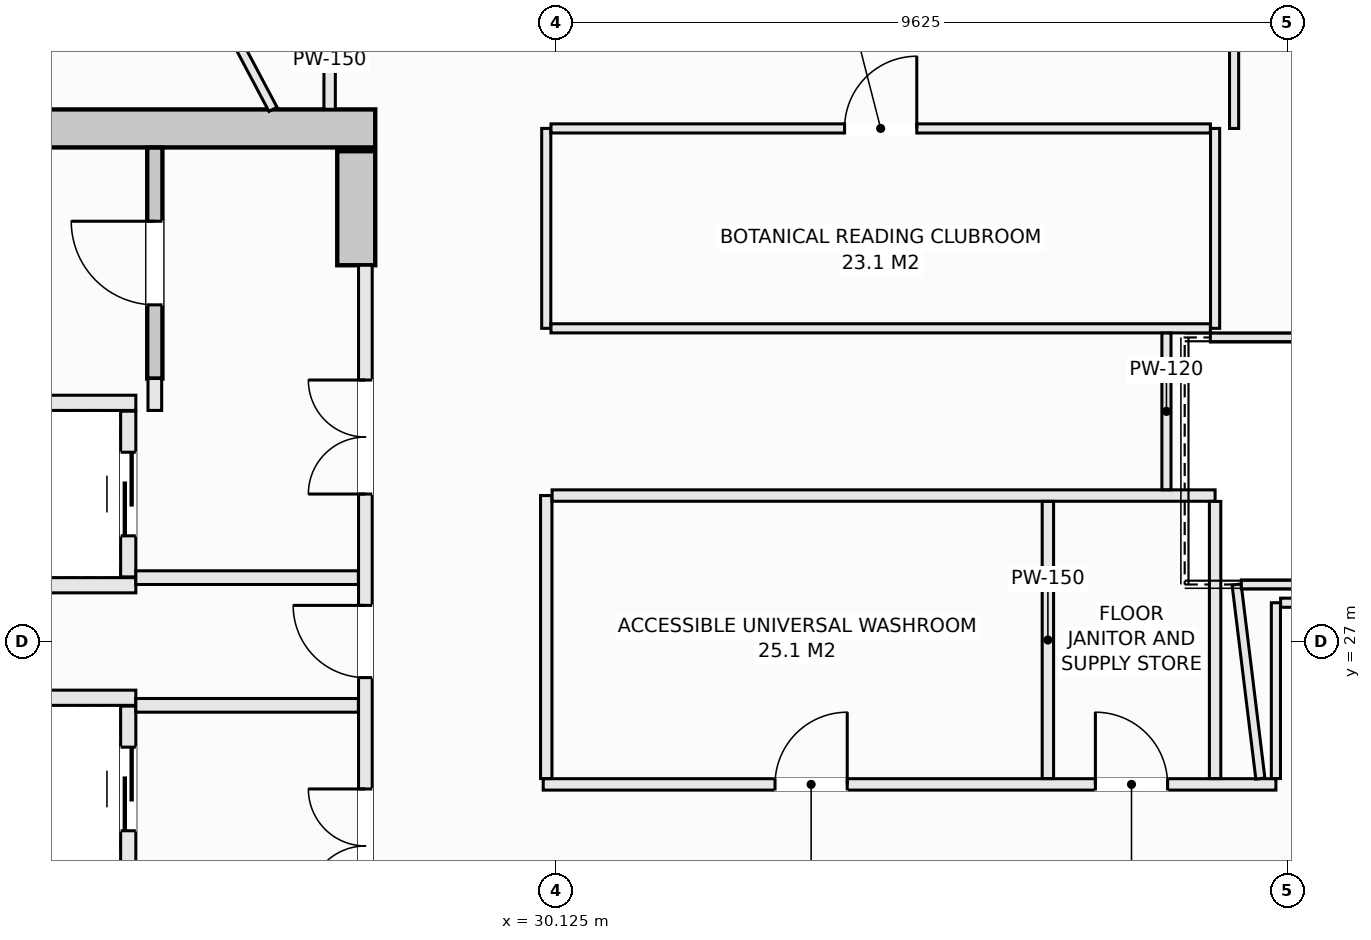
"""IFC4 building model, lengths in metres.
Left out: names, types, materials, properties, quantities, classifications, styles, units other than length and angle.
Written with IfcOpenShell. Run it as: python <this file> out.ifc"""

import sys

from ifc_helpers import new_model, si_unit, direction, frame, frame_2d, origin, place, context, subcontext, project, spatial, rectangle, extrude, element, fill, save


model = new_model("IFC4")
c1 = context("Model", 3, precision=1e-05, world=origin(), true_north=direction((0.0, 1.0)))
c2 = subcontext(c1, "Body", "Model", "MODEL_VIEW")
j1 = project(units=[si_unit("LENGTHUNIT", "METRE"), si_unit("PLANEANGLEUNIT", "RADIAN")], contexts=[c1])
p1 = place(None, origin())
s1 = spatial("IfcSite", under=j1, at=p1, CompositionType="ELEMENT")
p2 = place(p1, origin())
s2 = spatial("IfcBuilding", under=s1, at=p2, CompositionType="ELEMENT")
p3 = place(p2, frame((0.0, 0.0, 212.9)))
s3 = spatial("IfcBuildingStorey", under=s2, at=p3, CompositionType="ELEMENT", Elevation=212.9)
p4 = place(p3, frame((14.25, 33.75, -0.27), z_axis=(0.0, 0.0, 1.0), x_axis=(1.0, 0.0, 0.0)))
e1 = element("IfcWall", 1, at=p4, inside=s3, PredefinedType="SHEAR", context=c2, shape_type="SweptSolid", body=[
    extrude(rectangle(XDim=13.5, YDim=0.5, at=frame_2d((6.75, 0.0))), origin(), (0.0, 0.0, 1.0), 3.3),
])
p5 = place(p3, frame((27.5, 31.95, -0.27), z_axis=(0.0, 0.0, 1.0), x_axis=(0.0, 1.0, 0.0)))
e2 = element("IfcWall", 2, at=p5, inside=s3, PredefinedType="SHEAR", context=c2, shape_type="SweptSolid", body=[
    extrude(rectangle(XDim=1.5, YDim=0.5, at=frame_2d((0.75, 0.0))), origin(), (0.0, 0.0, 1.0), 3.3),
])
p6 = place(p3, frame((24.85, 30.46, -0.27), z_axis=(0.0, 0.0, 1.0), x_axis=(0.0, 1.0, 0.0)))
e3 = element("IfcWall", 3, at=p6, inside=s3, PredefinedType="SHEAR", context=c2, shape_type="SweptSolid", body=[
    extrude(rectangle(XDim=3.038, YDim=0.2, at=frame_2d((1.519, 0.0))), origin(), (0.0, 0.0, 1.0), 3.3),
])
p7 = place(p6, frame((0.969, 0.0, 0.27)))
e4 = element("IfcOpeningElement", 4, at=p7, cuts=e3, PredefinedType="OPENING", context=c2, shape_type="SweptSolid", body=[
    extrude(rectangle(XDim=1.1, YDim=2.15, at=frame_2d((0.55, 1.075))), frame((0.0, 0.11, 0.0), z_axis=(0.0, -1.0, 0.0), x_axis=(1.0, 0.0, 0.0)), (0.0, 0.0, 1.0), 0.22),
])
for number, where, z_axis, x_axis in (
    (5, (22.15, 30.14, 0.0), (0.0, 0.0, 1.0), (1.0, 0.0, 0.0)),
    (6, (22.15, 27.74, 0.0), (0.0, 0.0, 1.0), (1.0, 0.0, 0.0)),
):
    element("IfcWall", number, at=place(p3, frame(where, z_axis=z_axis, x_axis=x_axis)), inside=s3, PredefinedType="SOLIDWALL", context=c2, shape_type="SweptSolid", body=[
        extrude(rectangle(XDim=2.45, YDim=0.2, at=frame_2d((1.225, 0.0))), origin(), (0.0, 0.0, 1.0), 3.03),
    ])
p8 = place(p3, frame((24.5, 27.85, 0.0), z_axis=(0.0, 0.0, 1.0), x_axis=(0.0, 1.0, 0.0)))
e7 = element("IfcWall", 7, at=p8, inside=s3, PredefinedType="SOLIDWALL", context=c2, shape_type="SweptSolid", body=[
    extrude(rectangle(XDim=2.18, YDim=0.2, at=frame_2d((1.09, 0.0))), origin(), (0.0, 0.0, 1.0), 3.03),
])
p9 = place(p8, frame((0.54, 0.0, 0.0)))
e8 = element("IfcOpeningElement", 8, at=p9, cuts=e7, PredefinedType="OPENING", context=c2, shape_type="SweptSolid", body=[
    extrude(rectangle(XDim=1.1, YDim=2.2, at=frame_2d((0.55, 1.1))), frame((0.0, 0.11, 0.0), z_axis=(0.0, -1.0, 0.0), x_axis=(1.0, 0.0, 0.0)), (0.0, 0.0, 1.0), 0.22),
])
p10 = place(p3, frame((22.15, 26.26, 0.0), z_axis=(0.0, 0.0, 1.0), x_axis=(1.0, 0.0, 0.0)))
e9 = element("IfcWall", 9, at=p10, inside=s3, PredefinedType="SOLIDWALL", context=c2, shape_type="SweptSolid", body=[
    extrude(rectangle(XDim=2.45, YDim=0.2, at=frame_2d((1.225, 0.0))), origin(), (0.0, 0.0, 1.0), 3.03),
])
p11 = place(p3, frame((24.5, 23.97, 0.0), z_axis=(0.0, 0.0, 1.0), x_axis=(0.0, 1.0, 0.0)))
e10 = element("IfcWall", 10, at=p11, inside=s3, PredefinedType="SOLIDWALL", context=c2, shape_type="SweptSolid", body=[
    extrude(rectangle(XDim=2.18, YDim=0.2, at=frame_2d((1.09, 0.0))), origin(), (0.0, 0.0, 1.0), 3.03),
])
p12 = place(p11, frame((0.54, 0.0, 0.0)))
e11 = element("IfcOpeningElement", 11, at=p12, cuts=e10, PredefinedType="OPENING", context=c2, shape_type="SweptSolid", body=[
    extrude(rectangle(XDim=1.1, YDim=2.2, at=frame_2d((0.55, 1.1))), frame((0.0, 0.11, 0.0), z_axis=(0.0, -1.0, 0.0), x_axis=(1.0, 0.0, 0.0)), (0.0, 0.0, 1.0), 0.22),
])
p13 = place(p3, frame((24.85, 30.04, 0.0), z_axis=(0.0, 0.0, 1.0), x_axis=(0.0, 1.0, 0.0)))
e12 = element("IfcWall", 12, at=p13, inside=s3, PredefinedType="SOLIDWALL", context=c2, shape_type="SweptSolid", body=[
    extrude(rectangle(XDim=0.42, YDim=0.18, at=frame_2d((0.21, 0.0))), origin(), (0.0, 0.0, 1.0), 3.03),
])
p14 = place(p3, frame((27.62, 22.05, 0.0), z_axis=(0.0, 0.0, 1.0), x_axis=(0.0, 1.0, 0.0)))
e13 = element("IfcWall", 13, at=p14, inside=s3, PredefinedType="SOLIDWALL", context=c2, shape_type="SweptSolid", body=[
    extrude(rectangle(XDim=9.9, YDim=0.18, at=frame_2d((4.95, 0.0))), origin(), (0.0, 0.0, 1.0), 3.03),
])
p15 = place(p14, frame((4.475, 0.0, 0.0)))
e14 = element("IfcOpeningElement", 14, at=p15, cuts=e13, PredefinedType="OPENING", context=c2, shape_type="SweptSolid", body=[
    extrude(rectangle(XDim=0.95, YDim=2.1, at=frame_2d((0.475, 1.05))), frame((0.0, 0.1, 0.0), z_axis=(0.0, -1.0, 0.0), x_axis=(1.0, 0.0, 0.0)), (0.0, 0.0, 1.0), 0.2),
])
p16 = place(p14, frame((6.89, 0.0, 0.0)))
e15 = element("IfcOpeningElement", 15, at=p16, cuts=e13, PredefinedType="OPENING", context=c2, shape_type="SweptSolid", body=[
    extrude(rectangle(XDim=1.5, YDim=2.2, at=frame_2d((0.75, 1.1))), frame((0.0, 0.1, 0.0), z_axis=(0.0, -1.0, 0.0), x_axis=(1.0, 0.0, 0.0)), (0.0, 0.0, 1.0), 0.2),
])
p17 = place(p14, frame((1.51, 0.0, 0.0)))
e16 = element("IfcOpeningElement", 16, at=p17, cuts=e13, PredefinedType="OPENING", context=c2, shape_type="SweptSolid", body=[
    extrude(rectangle(XDim=1.5, YDim=2.2, at=frame_2d((0.75, 1.1))), frame((0.0, 0.1, 0.0), z_axis=(0.0, -1.0, 0.0), x_axis=(1.0, 0.0, 0.0)), (0.0, 0.0, 1.0), 0.2),
])
for number, where, z_axis, x_axis in (
    (17, (24.6, 27.84, 0.0), (0.0, 0.0, 1.0), (1.0, 0.0, 0.0)),
    (18, (24.6, 26.16, 0.0), (0.0, 0.0, 1.0), (1.0, 0.0, 0.0)),
):
    element("IfcWall", number, at=place(p3, frame(where, z_axis=z_axis, x_axis=x_axis)), inside=s3, PredefinedType="SOLIDWALL", context=c2, shape_type="SweptSolid", body=[
        extrude(rectangle(XDim=2.928, YDim=0.18, at=frame_2d((1.464, 0.0))), origin(), (0.0, 0.0, 1.0), 3.03),
    ])
p18 = place(p3, frame((27.15, 34.002, 0.0), z_axis=(0.0, 0.0, 1.0), x_axis=(0.0, 1.0, 0.0)))
e19 = element("IfcWall", 19, at=p18, inside=s3, PredefinedType="PARTITIONING", context=c2, shape_type="SweptSolid", body=[
    extrude(rectangle(XDim=4.198, YDim=0.15, at=frame_2d((2.099, 0.0))), origin(), (0.0, 0.0, 1.0), 3.03),
])
p19 = place(p18, frame((1.998, 0.0, 0.0)))
e20 = element("IfcOpeningElement", 20, at=p19, cuts=e19, PredefinedType="OPENING", context=c2, shape_type="SweptSolid", body=[
    extrude(rectangle(XDim=0.95, YDim=2.1, at=frame_2d((0.475, 1.05))), frame((0.0, 0.085, 0.0), z_axis=(0.0, -1.0, 0.0), x_axis=(1.0, 0.0, 0.0)), (0.0, 0.0, 1.0), 0.17),
])
p20 = place(p3, frame((29.96, 25.12, 0.0), z_axis=(0.0, 0.0, 1.0), x_axis=(1.0, 0.0, 0.0)))
e21 = element("IfcWall", 21, at=p20, inside=s3, PredefinedType="PARTITIONING", context=c2, shape_type="SweptSolid", body=[
    extrude(rectangle(XDim=9.64, YDim=0.15, at=frame_2d((4.82, 0.0))), origin(), (0.0, 0.0, 1.0), 3.03),
])
p21 = place(p20, frame((3.05, 0.0, 0.0)))
e22 = element("IfcOpeningElement", 22, at=p21, cuts=e21, PredefinedType="OPENING", context=c2, shape_type="SweptSolid", body=[
    extrude(rectangle(XDim=0.95, YDim=2.1, at=frame_2d((0.475, 1.05))), frame((0.0, 0.085, 0.0), z_axis=(0.0, -1.0, 0.0), x_axis=(1.0, 0.0, 0.0)), (0.0, 0.0, 1.0), 0.17),
])
p22 = place(p20, frame((7.265, 0.0, 0.0)))
e23 = element("IfcOpeningElement", 23, at=p22, cuts=e21, PredefinedType="OPENING", context=c2, shape_type="SweptSolid", body=[
    extrude(rectangle(XDim=0.95, YDim=2.1, at=frame_2d((0.475, 1.05))), frame((0.0, 0.085, 0.0), z_axis=(0.0, -1.0, 0.0), x_axis=(1.0, 0.0, 0.0)), (0.0, 0.0, 1.0), 0.17),
])
p23 = place(p3, frame((30.0, 25.197, 0.0), z_axis=(0.0, 0.0, 1.0), x_axis=(0.0, 1.0, 0.0)))
e24 = element("IfcWall", 24, at=p23, inside=s3, PredefinedType="PARTITIONING", context=c2, shape_type="SweptSolid", body=[
    extrude(rectangle(XDim=3.723, YDim=0.15, at=frame_2d((1.861, 0.0))), origin(), (0.0, 0.0, 1.0), 3.03),
])
p24 = place(p3, frame((30.0, 31.12, 0.0), z_axis=(0.0, 0.0, 1.0), x_axis=(0.0, 1.0, 0.0)))
e25 = element("IfcWall", 25, at=p24, inside=s3, PredefinedType="PARTITIONING", context=c2, shape_type="SweptSolid", body=[
    extrude(rectangle(XDim=2.63, YDim=0.12, at=frame_2d((1.315, 0.0))), origin(), (0.0, 0.0, 1.0), 3.03),
])
p25 = place(p3, frame((30.077, 28.92, 0.0), z_axis=(0.0, 0.0, 1.0), x_axis=(1.0, 0.0, 0.0)))
e26 = element("IfcWall", 26, at=p25, inside=s3, PredefinedType="PARTITIONING", context=c2, shape_type="SweptSolid", body=[
    extrude(rectangle(XDim=8.723, YDim=0.15, at=frame_2d((4.362, 0.0))), origin(), (0.0, 0.0, 1.0), 3.03),
])
for number, where, z_axis, x_axis in (
    (27, (36.6, 25.197, 0.0), (0.0, 0.0, 1.0), (0.0, 1.0, 0.0)),
    (28, (38.8, 25.197, 0.0), (0.0, 0.0, 1.0), (0.0, 1.0, 0.0)),
):
    element("IfcWall", number, at=place(p3, frame(where, z_axis=z_axis, x_axis=x_axis)), inside=s3, PredefinedType="PARTITIONING", context=c2, shape_type="SweptSolid", body=[
        extrude(rectangle(XDim=3.646, YDim=0.15, at=frame_2d((1.823, 0.0))), origin(), (0.0, 0.0, 1.0), 3.03),
    ])
p26 = place(p3, frame((38.8, 31.12, 0.0), z_axis=(0.0, 0.0, 1.0), x_axis=(0.0, 1.0, 0.0)))
e29 = element("IfcWall", 29, at=p26, inside=s3, PredefinedType="PARTITIONING", context=c2, shape_type="SweptSolid", body=[
    extrude(rectangle(XDim=2.63, YDim=0.12, at=frame_2d((1.315, 0.0))), origin(), (0.0, 0.0, 1.0), 3.03),
])
p27 = place(p3, frame((30.062, 31.12, 0.0), z_axis=(0.0, 0.0, 1.0), x_axis=(1.0, 0.0, 0.0)))
e30 = element("IfcWall", 30, at=p27, inside=s3, PredefinedType="PARTITIONING", context=c2, shape_type="SweptSolid", body=[
    extrude(rectangle(XDim=8.676, YDim=0.12, at=frame_2d((4.338, 0.0))), origin(), (0.0, 0.0, 1.0), 3.03),
])
p28 = place(p3, frame((30.062, 33.75, 0.0), z_axis=(0.0, 0.0, 1.0), x_axis=(1.0, 0.0, 0.0)))
e31 = element("IfcWall", 31, at=p28, inside=s3, PredefinedType="PARTITIONING", context=c2, shape_type="SweptSolid", body=[
    extrude(rectangle(XDim=8.676, YDim=0.12, at=frame_2d((4.338, 0.0))), origin(), (0.0, 0.0, 1.0), 3.03),
])
p29 = place(p28, frame((3.863, 0.0, 0.0)))
e32 = element("IfcOpeningElement", 32, at=p29, cuts=e31, PredefinedType="OPENING", context=c2, shape_type="SweptSolid", body=[
    extrude(rectangle(XDim=0.95, YDim=2.1, at=frame_2d((0.475, 1.05))), frame((0.0, 0.07, 0.0), z_axis=(0.0, -1.0, 0.0), x_axis=(1.0, 0.0, 0.0)), (0.0, 0.0, 1.0), 0.14),
])
p30 = place(p3, frame((39.05, 33.75, 0.0), z_axis=(0.0, 0.0, 1.0), x_axis=(0.0, 1.0, 0.0)))
e33 = element("IfcWall", 33, at=p30, inside=s3, PredefinedType="PARTITIONING", context=c2, shape_type="SweptSolid", body=[
    extrude(rectangle(XDim=1.938, YDim=0.12, at=frame_2d((0.969, 0.0))), origin(), (0.0, 0.0, 1.0), 3.03),
])
p31 = place(p3, frame((38.16, 28.997, 0.0), z_axis=(0.0, 0.0, 1.0), x_axis=(0.0, 1.0, 0.0)))
e34 = element("IfcWall", 34, at=p31, inside=s3, PredefinedType="PARTITIONING", context=c2, shape_type="SweptSolid", body=[
    extrude(rectangle(XDim=2.061, YDim=0.12, at=frame_2d((1.031, 0.0))), origin(), (0.0, 0.0, 1.0), 3.03),
])
p32 = place(p3, frame((39.6, 25.197, 0.0), z_axis=(0.0, 0.0, 1.0), x_axis=(0.0, 1.0, 0.0)))
e35 = element("IfcWall", 35, at=p32, inside=s3, PredefinedType="PARTITIONING", context=c2, shape_type="SweptSolid", body=[
    extrude(rectangle(XDim=2.313, YDim=0.12, at=frame_2d((1.156, 0.0))), origin(), (0.0, 0.0, 1.0), 3.03),
])
p33 = place(p3, frame((39.662, 27.51, 0.0), z_axis=(0.0, 0.0, 1.0), x_axis=(1.0, 0.0, 0.0)))
e36 = element("IfcWall", 36, at=p33, inside=s3, PredefinedType="PARTITIONING", context=c2, shape_type="SweptSolid", body=[
    extrude(rectangle(XDim=1.858, YDim=0.12, at=frame_2d((0.929, 0.0))), origin(), (0.0, 0.0, 1.0), 3.03),
])
p34 = place(p3, frame((39.083, 27.75, 0.0), z_axis=(0.0, 0.0, 1.0), x_axis=(0.121499202199, -0.992591529213, 0.0)))
e37 = element("IfcWall", 37, at=p34, inside=s3, PredefinedType="PARTITIONING", context=c2, shape_type="SweptSolid", body=[
    extrude(rectangle(XDim=2.572, YDim=0.12, at=frame_2d((1.286, 0.0))), origin(), (0.0, 0.0, 1.0), 3.03),
])
p35 = place(p3, frame((39.146, 27.75, 0.0), z_axis=(0.0, 0.0, 1.0), x_axis=(1.0, 0.0, 0.0)))
e38 = element("IfcWall", 38, at=p35, inside=s3, PredefinedType="PARTITIONING", context=c2, shape_type="SweptSolid", body=[
    extrude(rectangle(XDim=4.955, YDim=0.12, at=frame_2d((2.477, 0.0))), origin(), (0.0, 0.0, 1.0), 3.03),
])
p36 = place(p3, frame((38.738, 31.0, 0.0), z_axis=(0.0, 0.0, 1.0), x_axis=(1.0, 0.0, 0.0)))
e39 = element("IfcWall", 39, at=p36, inside=s3, PredefinedType="PARTITIONING", context=c2, shape_type="SweptSolid", body=[
    extrude(rectangle(XDim=5.3, YDim=0.12, at=frame_2d((2.65, 0.0))), origin(), (0.0, 0.0, 1.0), 3.03),
])
p37 = place(p3, frame((25.831, 35.083, 0.0), z_axis=(0.0, 0.0, 1.0), x_axis=(0.468630025993, -0.883394531757, 0.0)))
e40 = element("IfcWall", 40, at=p37, inside=s3, PredefinedType="PARTITIONING", context=c2, shape_type="SweptSolid", body=[
    extrude(rectangle(XDim=1.224, YDim=0.12, at=frame_2d((0.612, 0.0))), origin(), (0.0, 0.0, 1.0), 3.03),
])
p38 = place(p7, origin())
e41 = element("IfcDoor", 41, at=p38, inside=s3, OperationType="SINGLE_SWING_RIGHT", PredefinedType="DOOR", context=c2, shape_type="SweptSolid", body=[
    extrude(rectangle(XDim=1.1, YDim=2.15, at=frame_2d((0.55, 1.075))), frame((0.0, 0.025, 0.0), z_axis=(0.0, -1.0, 0.0), x_axis=(1.0, 0.0, 0.0)), (0.0, 0.0, 1.0), 0.05),
])
fill(e4, e41)
p39 = place(p9, origin())
e42 = element("IfcDoor", 42, at=p39, inside=s3, OperationType="SLIDING_TO_LEFT", PredefinedType="DOOR", context=c2, shape_type="SweptSolid", body=[
    extrude(rectangle(XDim=1.1, YDim=2.2, at=frame_2d((0.55, 1.1))), frame((0.0, 0.025, 0.0), z_axis=(0.0, -1.0, 0.0), x_axis=(1.0, 0.0, 0.0)), (0.0, 0.0, 1.0), 0.05),
])
fill(e8, e42)
p40 = place(p12, origin())
e43 = element("IfcDoor", 43, at=p40, inside=s3, OperationType="SLIDING_TO_LEFT", PredefinedType="DOOR", context=c2, shape_type="SweptSolid", body=[
    extrude(rectangle(XDim=1.1, YDim=2.2, at=frame_2d((0.55, 1.1))), frame((0.0, 0.025, 0.0), z_axis=(0.0, -1.0, 0.0), x_axis=(1.0, 0.0, 0.0)), (0.0, 0.0, 1.0), 0.05),
])
fill(e11, e43)
p41 = place(p15, origin())
e44 = element("IfcDoor", 44, at=p41, inside=s3, OperationType="SINGLE_SWING_RIGHT", PredefinedType="DOOR", context=c2, shape_type="SweptSolid", body=[
    extrude(rectangle(XDim=0.95, YDim=2.1, at=frame_2d((0.475, 1.05))), frame((0.0, 0.025, 0.0), z_axis=(0.0, -1.0, 0.0), x_axis=(1.0, 0.0, 0.0)), (0.0, 0.0, 1.0), 0.05),
])
fill(e14, e44)
p42 = place(p16, origin())
e45 = element("IfcDoor", 45, at=p42, inside=s3, OperationType="DOUBLE_DOOR_SINGLE_SWING", PredefinedType="DOOR", context=c2, shape_type="SweptSolid", body=[
    extrude(rectangle(XDim=1.5, YDim=2.2, at=frame_2d((0.75, 1.1))), frame((0.0, 0.025, 0.0), z_axis=(0.0, -1.0, 0.0), x_axis=(1.0, 0.0, 0.0)), (0.0, 0.0, 1.0), 0.05),
])
fill(e15, e45)
p43 = place(p17, origin())
e46 = element("IfcDoor", 46, at=p43, inside=s3, OperationType="DOUBLE_DOOR_SINGLE_SWING", PredefinedType="DOOR", context=c2, shape_type="SweptSolid", body=[
    extrude(rectangle(XDim=1.5, YDim=2.2, at=frame_2d((0.75, 1.1))), frame((0.0, 0.025, 0.0), z_axis=(0.0, -1.0, 0.0), x_axis=(1.0, 0.0, 0.0)), (0.0, 0.0, 1.0), 0.05),
])
fill(e16, e46)
p44 = place(p21, origin())
e47 = element("IfcDoor", 47, at=p44, inside=s3, OperationType="SINGLE_SWING_RIGHT", PredefinedType="DOOR", context=c2, shape_type="SweptSolid", body=[
    extrude(rectangle(XDim=0.95, YDim=2.1, at=frame_2d((0.475, 1.05))), frame((0.0, 0.025, 0.0), z_axis=(0.0, -1.0, 0.0), x_axis=(1.0, 0.0, 0.0)), (0.0, 0.0, 1.0), 0.05),
])
fill(e22, e47)
p45 = place(p22, origin())
e48 = element("IfcDoor", 48, at=p45, inside=s3, OperationType="SINGLE_SWING_LEFT", PredefinedType="DOOR", context=c2, shape_type="SweptSolid", body=[
    extrude(rectangle(XDim=0.95, YDim=2.1, at=frame_2d((0.475, 1.05))), frame((0.0, 0.025, 0.0), z_axis=(0.0, -1.0, 0.0), x_axis=(1.0, 0.0, 0.0)), (0.0, 0.0, 1.0), 0.05),
])
fill(e23, e48)
p46 = place(p29, origin())
e49 = element("IfcDoor", 49, at=p46, inside=s3, OperationType="SINGLE_SWING_RIGHT", PredefinedType="DOOR", context=c2, shape_type="SweptSolid", body=[
    extrude(rectangle(XDim=0.95, YDim=2.1, at=frame_2d((0.475, 1.05))), frame((0.0, 0.025, 0.0), z_axis=(0.0, -1.0, 0.0), x_axis=(1.0, 0.0, 0.0)), (0.0, 0.0, 1.0), 0.05),
])
fill(e32, e49)
save(model, sys.argv[1])
